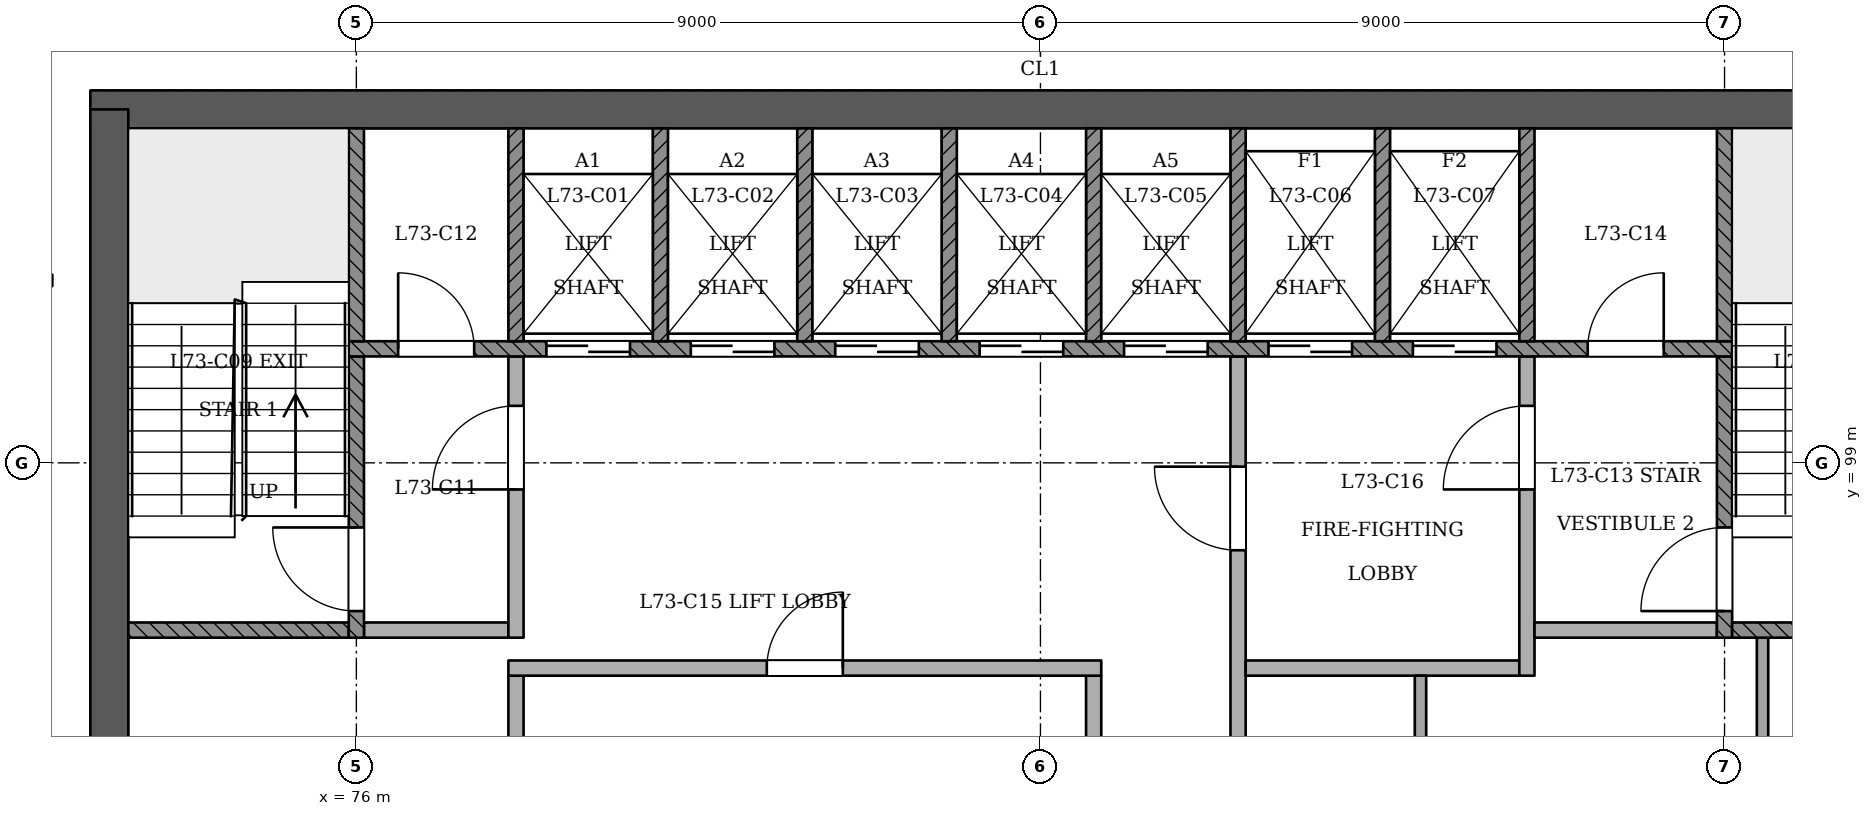
"""IFC4 building model, lengths in metres.
Left out: names, types, materials, properties, quantities, classifications, styles, units other than length and angle.
Written with IfcOpenShell. Run it as: python <this file> out.ifc"""

import sys

from ifc_helpers import new_model, si_unit, direction, frame, frame_2d, origin, place, context, subcontext, project, spatial, rectangle, extrude, element, fill, save


model = new_model("IFC4")
c1 = context("Model", 3, precision=1e-05, world=origin(), true_north=direction((0.0, 1.0)))
c2 = subcontext(c1, "Body", "Model", "MODEL_VIEW")
j1 = project(units=[si_unit("LENGTHUNIT", "METRE"), si_unit("PLANEANGLEUNIT", "RADIAN")], contexts=[c1])
p1 = place(None, origin())
s1 = spatial("IfcSite", under=j1, at=p1, CompositionType="ELEMENT")
p2 = place(p1, origin())
s2 = spatial("IfcBuilding", under=s1, at=p2, CompositionType="ELEMENT")
p3 = place(p2, frame((0.0, 0.0, 282.4)))
s3 = spatial("IfcBuildingStorey", under=s2, at=p3, CompositionType="ELEMENT", Elevation=282.4)
p4 = place(p3, frame((97.25, 103.65, 0.0), z_axis=(0.0, 0.0, 1.0), x_axis=(-1.0, 0.0, 0.0)))
e1 = element("IfcWall", 1, at=p4, inside=s3, PredefinedType="SHEAR", context=c2, shape_type="SweptSolid", body=[
    extrude(rectangle(XDim=24.75, YDim=0.5, at=frame_2d((12.375, 0.0))), origin(), (0.0, 0.0, 1.0), 3.6),
])
p5 = place(p3, frame((72.75, 103.65, 0.0), z_axis=(0.0, 0.0, 1.0), x_axis=(0.0, -1.0, 0.0)))
e2 = element("IfcWall", 2, at=p5, inside=s3, PredefinedType="SHEAR", context=c2, shape_type="SweptSolid", body=[
    extrude(rectangle(XDim=10.75, YDim=0.5, at=frame_2d((5.375, 0.0))), origin(), (0.0, 0.0, 1.0), 3.6),
])
p6 = place(p3, frame((72.0, 101.4, 0.0), z_axis=(0.0, 0.0, 1.0), x_axis=(-1.0, 0.0, 0.0)))
e3 = element("IfcWall", 3, at=p6, inside=s3, PredefinedType="PARTITIONING", context=c2, shape_type="SweptSolid", body=[
    extrude(rectangle(XDim=1.8, YDim=0.15, at=frame_2d((0.9, 0.0))), origin(), (0.0, 0.0, 1.0), 3.3),
])
p7 = place(p6, frame((0.55, 0.0, 0.0)))
e4 = element("IfcOpeningElement", 4, at=p7, cuts=e3, PredefinedType="OPENING", context=c2, shape_type="SweptSolid", body=[
    extrude(rectangle(XDim=1.0, YDim=2.1, at=frame_2d((0.5, 1.05))), frame((0.0, 0.085, 0.0), z_axis=(0.0, -1.0, 0.0), x_axis=(1.0, 0.0, 0.0)), (0.0, 0.0, 1.0), 0.171),
])
for number, where, z_axis, x_axis in (
    (5, (78.1, 93.4, 0.0), (0.0, 0.0, 1.0), (0.0, 1.0, 0.0)),
    (6, (85.7, 93.4, 0.0), (0.0, 0.0, 1.0), (0.0, 1.0, 0.0)),
):
    element("IfcWall", number, at=place(p3, frame(where, z_axis=z_axis, x_axis=x_axis)), inside=s3, PredefinedType="PARTITIONING", context=c2, shape_type="SweptSolid", body=[
        extrude(rectangle(XDim=2.8, YDim=0.2, at=frame_2d((1.4, 0.0))), origin(), (0.0, 0.0, 1.0), 3.3),
    ])
p8 = place(p3, frame((87.6, 93.4, 0.0), z_axis=(0.0, 0.0, 1.0), x_axis=(0.0, 1.0, 0.0)))
e7 = element("IfcWall", 7, at=p8, inside=s3, PredefinedType="PARTITIONING", context=c2, shape_type="SweptSolid", body=[
    extrude(rectangle(XDim=7.0, YDim=0.2, at=frame_2d((3.5, 0.0))), origin(), (0.0, 0.0, 1.0), 3.3),
])
p9 = place(p8, frame((4.45, 0.0, 0.0)))
e8 = element("IfcOpeningElement", 8, at=p9, cuts=e7, PredefinedType="OPENING", context=c2, shape_type="SweptSolid", body=[
    extrude(rectangle(XDim=1.1, YDim=2.1, at=frame_2d((0.55, 1.05))), frame((0.0, 0.11, 0.0), z_axis=(0.0, -1.0, 0.0), x_axis=(1.0, 0.0, 0.0)), (0.0, 0.0, 1.0), 0.221),
])
p10 = place(p3, frame((90.0, 93.4, 0.0), z_axis=(0.0, 0.0, 1.0), x_axis=(0.0, 1.0, 0.0)))
e9 = element("IfcWall", 9, at=p10, inside=s3, PredefinedType="PARTITIONING", context=c2, shape_type="SweptSolid", body=[
    extrude(rectangle(XDim=2.8, YDim=0.15, at=frame_2d((1.4, 0.0))), origin(), (0.0, 0.0, 1.0), 3.3),
])
p11 = place(p3, frame((94.5, 93.4, 0.0), z_axis=(0.0, 0.0, 1.0), x_axis=(0.0, 1.0, 0.0)))
e10 = element("IfcWall", 10, at=p11, inside=s3, PredefinedType="PARTITIONING", context=c2, shape_type="SweptSolid", body=[
    extrude(rectangle(XDim=3.3, YDim=0.15, at=frame_2d((1.65, 0.0))), origin(), (0.0, 0.0, 1.0), 3.3),
])
p12 = place(p3, frame((78.0, 96.3, 0.0), z_axis=(0.0, 0.0, 1.0), x_axis=(1.0, 0.0, 0.0)))
e11 = element("IfcWall", 11, at=p12, inside=s3, PredefinedType="PARTITIONING", context=c2, shape_type="SweptSolid", body=[
    extrude(rectangle(XDim=7.8, YDim=0.2, at=frame_2d((3.9, 0.0))), origin(), (0.0, 0.0, 1.0), 3.3),
])
p13 = place(p12, frame((3.4, 0.0, 0.0)))
e12 = element("IfcOpeningElement", 12, at=p13, cuts=e11, PredefinedType="OPENING", context=c2, shape_type="SweptSolid", body=[
    extrude(rectangle(XDim=1.0, YDim=2.1, at=frame_2d((0.5, 1.05))), frame((0.0, 0.11, 0.0), z_axis=(0.0, -1.0, 0.0), x_axis=(1.0, 0.0, 0.0)), (0.0, 0.0, 1.0), 0.221),
])
p14 = place(p3, frame((87.7, 96.3, 0.0), z_axis=(0.0, 0.0, 1.0), x_axis=(1.0, 0.0, 0.0)))
e13 = element("IfcWall", 13, at=p14, inside=s3, PredefinedType="PARTITIONING", context=c2, shape_type="SweptSolid", body=[
    extrude(rectangle(XDim=3.6, YDim=0.2, at=frame_2d((1.8, 0.0))), origin(), (0.0, 0.0, 1.0), 3.3),
])
p15 = place(p3, frame((91.4, 96.2, 0.0), z_axis=(0.0, 0.0, 1.0), x_axis=(0.0, 1.0, 0.0)))
e14 = element("IfcWall", 14, at=p15, inside=s3, PredefinedType="PARTITIONING", context=c2, shape_type="SweptSolid", body=[
    extrude(rectangle(XDim=4.2, YDim=0.2, at=frame_2d((2.1, 0.0))), origin(), (0.0, 0.0, 1.0), 3.3),
])
p16 = place(p15, frame((2.45, 0.0, 0.0)))
e15 = element("IfcOpeningElement", 15, at=p16, cuts=e14, PredefinedType="OPENING", context=c2, shape_type="SweptSolid", body=[
    extrude(rectangle(XDim=1.1, YDim=2.1, at=frame_2d((0.55, 1.05))), frame((0.0, 0.11, 0.0), z_axis=(0.0, -1.0, 0.0), x_axis=(1.0, 0.0, 0.0)), (0.0, 0.0, 1.0), 0.221),
])
p17 = place(p3, frame((73.0, 96.8, 0.0), z_axis=(0.0, 0.0, 1.0), x_axis=(1.0, 0.0, 0.0)))
e16 = element("IfcWall", 16, at=p17, inside=s3, PredefinedType="SOLIDWALL", context=c2, shape_type="SweptSolid", body=[
    extrude(rectangle(XDim=2.9, YDim=0.2, at=frame_2d((1.45, 0.0))), origin(), (0.0, 0.0, 1.0), 3.3),
])
p18 = place(p3, frame((76.0, 96.7, 0.0), z_axis=(0.0, 0.0, 1.0), x_axis=(0.0, 1.0, 0.0)))
e17 = element("IfcWall", 17, at=p18, inside=s3, PredefinedType="SOLIDWALL", context=c2, shape_type="SweptSolid", body=[
    extrude(rectangle(XDim=3.7, YDim=0.2, at=frame_2d((1.85, 0.0))), origin(), (0.0, 0.0, 1.0), 3.3),
])
p19 = place(p18, frame((0.35, 0.0, 0.0)))
e18 = element("IfcOpeningElement", 18, at=p19, cuts=e17, PredefinedType="OPENING", context=c2, shape_type="SweptSolid", body=[
    extrude(rectangle(XDim=1.1, YDim=2.1, at=frame_2d((0.55, 1.05))), frame((0.0, 0.11, 0.0), z_axis=(0.0, -1.0, 0.0), x_axis=(1.0, 0.0, 0.0)), (0.0, 0.0, 1.0), 0.221),
])
p20 = place(p3, frame((76.1, 96.8, 0.0), z_axis=(0.0, 0.0, 1.0), x_axis=(1.0, 0.0, 0.0)))
e19 = element("IfcWall", 19, at=p20, inside=s3, PredefinedType="PARTITIONING", context=c2, shape_type="SweptSolid", body=[
    extrude(rectangle(XDim=1.9, YDim=0.2, at=frame_2d((0.95, 0.0))), origin(), (0.0, 0.0, 1.0), 3.3),
])
p21 = place(p3, frame((78.1, 96.7, 0.0), z_axis=(0.0, 0.0, 1.0), x_axis=(0.0, 1.0, 0.0)))
e20 = element("IfcWall", 20, at=p21, inside=s3, PredefinedType="PARTITIONING", context=c2, shape_type="SweptSolid", body=[
    extrude(rectangle(XDim=3.7, YDim=0.2, at=frame_2d((1.85, 0.0))), origin(), (0.0, 0.0, 1.0), 3.3),
])
p22 = place(p21, frame((1.95, 0.0, 0.0)))
e21 = element("IfcOpeningElement", 21, at=p22, cuts=e20, PredefinedType="OPENING", context=c2, shape_type="SweptSolid", body=[
    extrude(rectangle(XDim=1.1, YDim=2.1, at=frame_2d((0.55, 1.05))), frame((0.0, 0.11, 0.0), z_axis=(0.0, -1.0, 0.0), x_axis=(1.0, 0.0, 0.0)), (0.0, 0.0, 1.0), 0.221),
])
p23 = place(p3, frame((91.5, 96.8, 0.0), z_axis=(0.0, 0.0, 1.0), x_axis=(1.0, 0.0, 0.0)))
e22 = element("IfcWall", 22, at=p23, inside=s3, PredefinedType="PARTITIONING", context=c2, shape_type="SweptSolid", body=[
    extrude(rectangle(XDim=2.4, YDim=0.2, at=frame_2d((1.2, 0.0))), origin(), (0.0, 0.0, 1.0), 3.3),
])
p24 = place(p3, frame((94.0, 96.7, 0.0), z_axis=(0.0, 0.0, 1.0), x_axis=(0.0, 1.0, 0.0)))
e23 = element("IfcWall", 23, at=p24, inside=s3, PredefinedType="SOLIDWALL", context=c2, shape_type="SweptSolid", body=[
    extrude(rectangle(XDim=3.7, YDim=0.2, at=frame_2d((1.85, 0.0))), origin(), (0.0, 0.0, 1.0), 3.3),
])
p25 = place(p24, frame((0.35, 0.0, 0.0)))
e24 = element("IfcOpeningElement", 24, at=p25, cuts=e23, PredefinedType="OPENING", context=c2, shape_type="SweptSolid", body=[
    extrude(rectangle(XDim=1.1, YDim=2.1, at=frame_2d((0.55, 1.05))), frame((0.0, 0.11, 0.0), z_axis=(0.0, -1.0, 0.0), x_axis=(1.0, 0.0, 0.0)), (0.0, 0.0, 1.0), 0.221),
])
p26 = place(p3, frame((94.1, 96.8, 0.0), z_axis=(0.0, 0.0, 1.0), x_axis=(1.0, 0.0, 0.0)))
e25 = element("IfcWall", 25, at=p26, inside=s3, PredefinedType="SOLIDWALL", context=c2, shape_type="SweptSolid", body=[
    extrude(rectangle(XDim=2.9, YDim=0.2, at=frame_2d((1.45, 0.0))), origin(), (0.0, 0.0, 1.0), 3.3),
])
p27 = place(p3, frame((75.9, 100.5, 0.0), z_axis=(0.0, 0.0, 1.0), x_axis=(1.0, 0.0, 0.0)))
e26 = element("IfcWall", 26, at=p27, inside=s3, PredefinedType="SOLIDWALL", context=c2, shape_type="SweptSolid", body=[
    extrude(rectangle(XDim=18.2, YDim=0.2, at=frame_2d((9.1, 0.0))), origin(), (0.0, 0.0, 1.0), 3.3),
])
p28 = place(p27, frame((2.6, 0.0, 0.0)))
e27 = element("IfcOpeningElement", 27, at=p28, cuts=e26, PredefinedType="OPENING", context=c2, shape_type="SweptSolid", body=[
    extrude(rectangle(XDim=1.1, YDim=2.1, at=frame_2d((0.55, 1.05))), frame((0.0, 0.11, 0.0), z_axis=(0.0, -1.0, 0.0), x_axis=(1.0, 0.0, 0.0)), (0.0, 0.0, 1.0), 0.221),
])
p29 = place(p27, frame((4.5, 0.0, 0.0)))
e28 = element("IfcOpeningElement", 28, at=p29, cuts=e26, PredefinedType="OPENING", context=c2, shape_type="SweptSolid", body=[
    extrude(rectangle(XDim=1.1, YDim=2.1, at=frame_2d((0.55, 1.05))), frame((0.0, 0.11, 0.0), z_axis=(0.0, -1.0, 0.0), x_axis=(1.0, 0.0, 0.0)), (0.0, 0.0, 1.0), 0.221),
])
p30 = place(p27, frame((6.4, 0.0, 0.0)))
e29 = element("IfcOpeningElement", 29, at=p30, cuts=e26, PredefinedType="OPENING", context=c2, shape_type="SweptSolid", body=[
    extrude(rectangle(XDim=1.1, YDim=2.1, at=frame_2d((0.55, 1.05))), frame((0.0, 0.11, 0.0), z_axis=(0.0, -1.0, 0.0), x_axis=(1.0, 0.0, 0.0)), (0.0, 0.0, 1.0), 0.221),
])
p31 = place(p27, frame((8.3, 0.0, 0.0)))
e30 = element("IfcOpeningElement", 30, at=p31, cuts=e26, PredefinedType="OPENING", context=c2, shape_type="SweptSolid", body=[
    extrude(rectangle(XDim=1.1, YDim=2.1, at=frame_2d((0.55, 1.05))), frame((0.0, 0.11, 0.0), z_axis=(0.0, -1.0, 0.0), x_axis=(1.0, 0.0, 0.0)), (0.0, 0.0, 1.0), 0.221),
])
p32 = place(p27, frame((10.2, 0.0, 0.0)))
e31 = element("IfcOpeningElement", 31, at=p32, cuts=e26, PredefinedType="OPENING", context=c2, shape_type="SweptSolid", body=[
    extrude(rectangle(XDim=1.1, YDim=2.1, at=frame_2d((0.55, 1.05))), frame((0.0, 0.11, 0.0), z_axis=(0.0, -1.0, 0.0), x_axis=(1.0, 0.0, 0.0)), (0.0, 0.0, 1.0), 0.221),
])
p33 = place(p27, frame((12.1, 0.0, 0.0)))
e32 = element("IfcOpeningElement", 32, at=p33, cuts=e26, PredefinedType="OPENING", context=c2, shape_type="SweptSolid", body=[
    extrude(rectangle(XDim=1.1, YDim=2.1, at=frame_2d((0.55, 1.05))), frame((0.0, 0.11, 0.0), z_axis=(0.0, -1.0, 0.0), x_axis=(1.0, 0.0, 0.0)), (0.0, 0.0, 1.0), 0.221),
])
p34 = place(p27, frame((14.0, 0.0, 0.0)))
e33 = element("IfcOpeningElement", 33, at=p34, cuts=e26, PredefinedType="OPENING", context=c2, shape_type="SweptSolid", body=[
    extrude(rectangle(XDim=1.1, YDim=2.1, at=frame_2d((0.55, 1.05))), frame((0.0, 0.11, 0.0), z_axis=(0.0, -1.0, 0.0), x_axis=(1.0, 0.0, 0.0)), (0.0, 0.0, 1.0), 0.221),
])
p35 = place(p27, frame((0.65, 0.0, 0.0)))
e34 = element("IfcOpeningElement", 34, at=p35, cuts=e26, PredefinedType="OPENING", context=c2, shape_type="SweptSolid", body=[
    extrude(rectangle(XDim=1.0, YDim=2.1, at=frame_2d((0.5, 1.05))), frame((0.0, 0.11, 0.0), z_axis=(0.0, -1.0, 0.0), x_axis=(1.0, 0.0, 0.0)), (0.0, 0.0, 1.0), 0.221),
])
p36 = place(p27, frame((16.3, 0.0, 0.0)))
e35 = element("IfcOpeningElement", 35, at=p36, cuts=e26, PredefinedType="OPENING", context=c2, shape_type="SweptSolid", body=[
    extrude(rectangle(XDim=1.0, YDim=2.1, at=frame_2d((0.5, 1.05))), frame((0.0, 0.11, 0.0), z_axis=(0.0, -1.0, 0.0), x_axis=(1.0, 0.0, 0.0)), (0.0, 0.0, 1.0), 0.221),
])
for number, where, z_axis, x_axis in (
    (36, (76.0, 100.6, 0.0), (0.0, 0.0, 1.0), (0.0, 1.0, 0.0)),
    (37, (78.1, 100.6, 0.0), (0.0, 0.0, 1.0), (0.0, 1.0, 0.0)),
    (38, (80.0, 100.6, 0.0), (0.0, 0.0, 1.0), (0.0, 1.0, 0.0)),
    (39, (81.9, 100.6, 0.0), (0.0, 0.0, 1.0), (0.0, 1.0, 0.0)),
    (40, (83.8, 100.6, 0.0), (0.0, 0.0, 1.0), (0.0, 1.0, 0.0)),
    (41, (85.7, 100.6, 0.0), (0.0, 0.0, 1.0), (0.0, 1.0, 0.0)),
    (42, (87.6, 100.6, 0.0), (0.0, 0.0, 1.0), (0.0, 1.0, 0.0)),
    (43, (89.5, 100.6, 0.0), (0.0, 0.0, 1.0), (0.0, 1.0, 0.0)),
    (44, (91.4, 100.6, 0.0), (0.0, 0.0, 1.0), (0.0, 1.0, 0.0)),
    (45, (94.0, 100.6, 0.0), (0.0, 0.0, 1.0), (0.0, 1.0, 0.0)),
):
    element("IfcWall", number, at=place(p3, frame(where, z_axis=z_axis, x_axis=x_axis)), inside=s3, PredefinedType="SOLIDWALL", context=c2, shape_type="SweptSolid", body=[
        extrude(rectangle(XDim=2.8, YDim=0.2, at=frame_2d((1.4, 0.0))), origin(), (0.0, 0.0, 1.0), 3.3),
    ])
p37 = place(p28, origin())
e46 = element("IfcDoor", 46, at=p37, inside=s3, OperationType="SLIDING_TO_RIGHT", PredefinedType="NOTDEFINED", context=c2, shape_type="SweptSolid", body=[
    extrude(rectangle(XDim=1.1, YDim=2.1, at=frame_2d((0.55, 1.05))), frame((0.0, 0.025, 0.0), z_axis=(0.0, -1.0, 0.0), x_axis=(1.0, 0.0, 0.0)), (0.0, 0.0, 1.0), 0.05),
])
fill(e27, e46)
p38 = place(p29, origin())
e47 = element("IfcDoor", 47, at=p38, inside=s3, OperationType="SLIDING_TO_LEFT", PredefinedType="NOTDEFINED", context=c2, shape_type="SweptSolid", body=[
    extrude(rectangle(XDim=1.1, YDim=2.1, at=frame_2d((0.55, 1.05))), frame((0.0, 0.025, 0.0), z_axis=(0.0, -1.0, 0.0), x_axis=(1.0, 0.0, 0.0)), (0.0, 0.0, 1.0), 0.05),
])
fill(e28, e47)
p39 = place(p30, origin())
e48 = element("IfcDoor", 48, at=p39, inside=s3, OperationType="SLIDING_TO_RIGHT", PredefinedType="NOTDEFINED", context=c2, shape_type="SweptSolid", body=[
    extrude(rectangle(XDim=1.1, YDim=2.1, at=frame_2d((0.55, 1.05))), frame((0.0, 0.025, 0.0), z_axis=(0.0, -1.0, 0.0), x_axis=(1.0, 0.0, 0.0)), (0.0, 0.0, 1.0), 0.05),
])
fill(e29, e48)
p40 = place(p31, origin())
e49 = element("IfcDoor", 49, at=p40, inside=s3, OperationType="SLIDING_TO_LEFT", PredefinedType="NOTDEFINED", context=c2, shape_type="SweptSolid", body=[
    extrude(rectangle(XDim=1.1, YDim=2.1, at=frame_2d((0.55, 1.05))), frame((0.0, 0.025, 0.0), z_axis=(0.0, -1.0, 0.0), x_axis=(1.0, 0.0, 0.0)), (0.0, 0.0, 1.0), 0.05),
])
fill(e30, e49)
p41 = place(p32, origin())
e50 = element("IfcDoor", 50, at=p41, inside=s3, OperationType="SLIDING_TO_RIGHT", PredefinedType="NOTDEFINED", context=c2, shape_type="SweptSolid", body=[
    extrude(rectangle(XDim=1.1, YDim=2.1, at=frame_2d((0.55, 1.05))), frame((0.0, 0.025, 0.0), z_axis=(0.0, -1.0, 0.0), x_axis=(1.0, 0.0, 0.0)), (0.0, 0.0, 1.0), 0.05),
])
fill(e31, e50)
p42 = place(p33, origin())
e51 = element("IfcDoor", 51, at=p42, inside=s3, OperationType="SLIDING_TO_RIGHT", PredefinedType="NOTDEFINED", context=c2, shape_type="SweptSolid", body=[
    extrude(rectangle(XDim=1.1, YDim=2.1, at=frame_2d((0.55, 1.05))), frame((0.0, 0.025, 0.0), z_axis=(0.0, -1.0, 0.0), x_axis=(1.0, 0.0, 0.0)), (0.0, 0.0, 1.0), 0.05),
])
fill(e32, e51)
p43 = place(p34, origin())
e52 = element("IfcDoor", 52, at=p43, inside=s3, OperationType="SLIDING_TO_LEFT", PredefinedType="NOTDEFINED", context=c2, shape_type="SweptSolid", body=[
    extrude(rectangle(XDim=1.1, YDim=2.1, at=frame_2d((0.55, 1.05))), frame((0.0, 0.025, 0.0), z_axis=(0.0, -1.0, 0.0), x_axis=(1.0, 0.0, 0.0)), (0.0, 0.0, 1.0), 0.05),
])
fill(e33, e52)
p44 = place(p19, origin())
e53 = element("IfcDoor", 53, at=p44, inside=s3, OperationType="SINGLE_SWING_RIGHT", PredefinedType="NOTDEFINED", context=c2, shape_type="SweptSolid", body=[
    extrude(rectangle(XDim=1.1, YDim=2.1, at=frame_2d((0.55, 1.05))), frame((0.0, 0.025, 0.0), z_axis=(0.0, -1.0, 0.0), x_axis=(1.0, 0.0, 0.0)), (0.0, 0.0, 1.0), 0.05),
])
fill(e18, e53)
p45 = place(p25, origin())
e54 = element("IfcDoor", 54, at=p45, inside=s3, OperationType="SINGLE_SWING_LEFT", PredefinedType="NOTDEFINED", context=c2, shape_type="SweptSolid", body=[
    extrude(rectangle(XDim=1.1, YDim=2.1, at=frame_2d((0.55, 1.05))), frame((0.0, 0.025, 0.0), z_axis=(0.0, -1.0, 0.0), x_axis=(1.0, 0.0, 0.0)), (0.0, 0.0, 1.0), 0.05),
])
fill(e24, e54)
p46 = place(p22, origin())
e55 = element("IfcDoor", 55, at=p46, inside=s3, OperationType="SINGLE_SWING_LEFT", PredefinedType="NOTDEFINED", context=c2, shape_type="SweptSolid", body=[
    extrude(rectangle(XDim=1.1, YDim=2.1, at=frame_2d((0.55, 1.05))), frame((0.0, 0.025, 0.0), z_axis=(0.0, -1.0, 0.0), x_axis=(1.0, 0.0, 0.0)), (0.0, 0.0, 1.0), 0.05),
])
fill(e21, e55)
p47 = place(p9, origin())
e56 = element("IfcDoor", 56, at=p47, inside=s3, OperationType="SINGLE_SWING_RIGHT", PredefinedType="NOTDEFINED", context=c2, shape_type="SweptSolid", body=[
    extrude(rectangle(XDim=1.1, YDim=2.1, at=frame_2d((0.55, 1.05))), frame((0.0, 0.025, 0.0), z_axis=(0.0, -1.0, 0.0), x_axis=(1.0, 0.0, 0.0)), (0.0, 0.0, 1.0), 0.05),
])
fill(e8, e56)
p48 = place(p16, origin())
e57 = element("IfcDoor", 57, at=p48, inside=s3, OperationType="SINGLE_SWING_LEFT", PredefinedType="NOTDEFINED", context=c2, shape_type="SweptSolid", body=[
    extrude(rectangle(XDim=1.1, YDim=2.1, at=frame_2d((0.55, 1.05))), frame((0.0, 0.025, 0.0), z_axis=(0.0, -1.0, 0.0), x_axis=(1.0, 0.0, 0.0)), (0.0, 0.0, 1.0), 0.05),
])
fill(e15, e57)
p49 = place(p35, origin())
e58 = element("IfcDoor", 58, at=p49, inside=s3, OperationType="SINGLE_SWING_LEFT", PredefinedType="NOTDEFINED", context=c2, shape_type="SweptSolid", body=[
    extrude(rectangle(XDim=1.0, YDim=2.1, at=frame_2d((0.5, 1.05))), frame((0.0, 0.025, 0.0), z_axis=(0.0, -1.0, 0.0), x_axis=(1.0, 0.0, 0.0)), (0.0, 0.0, 1.0), 0.05),
])
fill(e34, e58)
p50 = place(p36, origin())
e59 = element("IfcDoor", 59, at=p50, inside=s3, OperationType="SINGLE_SWING_RIGHT", PredefinedType="NOTDEFINED", context=c2, shape_type="SweptSolid", body=[
    extrude(rectangle(XDim=1.0, YDim=2.1, at=frame_2d((0.5, 1.05))), frame((0.0, 0.025, 0.0), z_axis=(0.0, -1.0, 0.0), x_axis=(1.0, 0.0, 0.0)), (0.0, 0.0, 1.0), 0.05),
])
fill(e35, e59)
p51 = place(p13, origin())
e60 = element("IfcDoor", 60, at=p51, inside=s3, OperationType="SINGLE_SWING_RIGHT", PredefinedType="NOTDEFINED", context=c2, shape_type="SweptSolid", body=[
    extrude(rectangle(XDim=1.0, YDim=2.1, at=frame_2d((0.5, 1.05))), frame((0.0, 0.025, 0.0), z_axis=(0.0, -1.0, 0.0), x_axis=(1.0, 0.0, 0.0)), (0.0, 0.0, 1.0), 0.05),
])
fill(e12, e60)
save(model, sys.argv[1])
